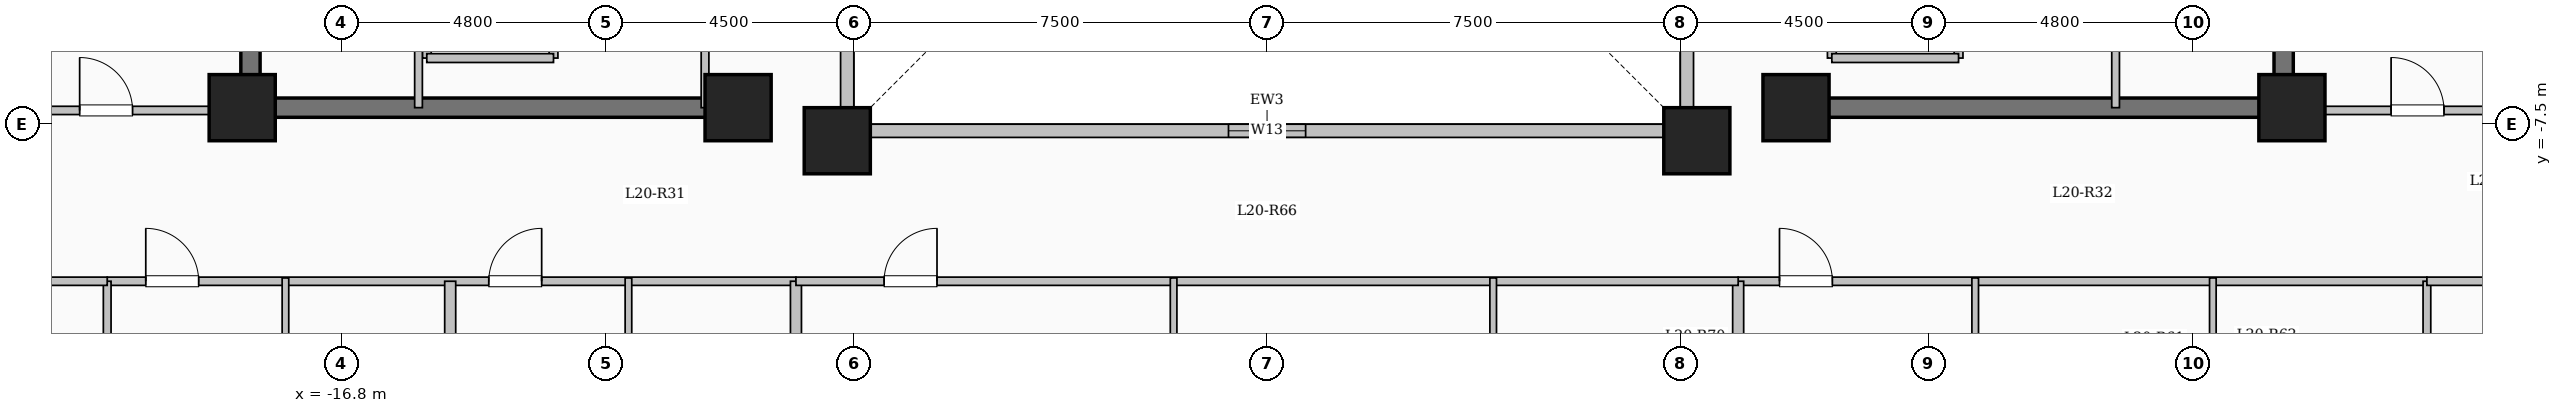
"""IFC4 building model, lengths in metres.
Left out: names, types, materials, properties, quantities, classifications, styles, units other than length and angle.
Written with IfcOpenShell. Run it as: python <this file> out.ifc"""

import sys

from ifc_helpers import new_model, si_unit, direction, frame, frame_2d, origin, origin_2d, place, context, subcontext, project, spatial, rectangle, extrude, element, fill, save


model = new_model("IFC4")
c1 = context("Model", 3, precision=1e-05, world=origin(), true_north=direction((0.0, 1.0)))
c2 = subcontext(c1, "Body", "Model", "MODEL_VIEW")
j1 = project(units=[si_unit("LENGTHUNIT", "METRE"), si_unit("PLANEANGLEUNIT", "RADIAN")], contexts=[c1])
p1 = place(None, origin())
s1 = spatial("IfcSite", under=j1, at=p1, CompositionType="ELEMENT")
p2 = place(p1, origin())
s2 = spatial("IfcBuilding", under=s1, at=p2, CompositionType="ELEMENT")
p3 = place(p2, frame((0.0, 0.0, 78.3)))
s3 = spatial("IfcBuildingStorey", under=s2, at=p3, CompositionType="ELEMENT", Elevation=78.3)
for number, where, z_axis, x_axis in (
    (1, (-7.8, -7.8, 0.0), (0.0, 0.0, 1.0), (1.0, 0.0, 0.0)),
    (2, (7.8, -7.8, 0.0), (0.0, 0.0, 1.0), (1.0, 0.0, 0.0)),
    (3, (-9.6, -7.2, 0.0), (0.0, 0.0, 1.0), (1.0, 0.0, 0.0)),
    (4, (9.6, -7.2, 0.0), (0.0, 0.0, 1.0), (1.0, 0.0, 0.0)),
    (5, (-18.6, -7.2, 0.0), (0.0, 0.0, 1.0), (1.0, 0.0, 0.0)),
    (6, (18.6, -7.2, 0.0), (0.0, 0.0, 1.0), (1.0, 0.0, 0.0)),
):
    element("IfcColumn", number, at=place(p3, frame(where, z_axis=z_axis, x_axis=x_axis)), inside=s3, PredefinedType="COLUMN", context=c2, shape_type="SweptSolid", body=[
        extrude(rectangle(XDim=1.2, YDim=1.2, at=origin_2d()), origin(), (0.0, 0.0, 1.0), 3.35),
    ])
p4 = place(p3, frame((-7.62, -7.62, 0.0), z_axis=(0.0, 0.0, 1.0), x_axis=(1.0, 0.0, 0.0)))
e7 = element("IfcWall", 7, at=p4, inside=s3, PredefinedType="SOLIDWALL", context=c2, shape_type="SweptSolid", body=[
    extrude(rectangle(XDim=15.24, YDim=0.24, at=frame_2d((7.62, 0.0))), origin(), (0.0, 0.0, 1.0), 3.1),
])
p5 = place(p4, frame((6.92, 0.0, 0.95)))
e8 = element("IfcOpeningElement", 8, at=p5, cuts=e7, PredefinedType="OPENING", context=c2, shape_type="SweptSolid", body=[
    extrude(rectangle(XDim=1.4, YDim=1.5, at=frame_2d((0.7, 0.75))), frame((0.0, 0.13, 0.0), z_axis=(0.0, -1.0, 0.0), x_axis=(1.0, 0.0, 0.0)), (0.0, 0.0, 1.0), 0.26),
])
p6 = place(p3, frame((7.62, -7.62, 0.0), z_axis=(0.0, 0.0, 1.0), x_axis=(0.0, 1.0, 0.0)))
e9 = element("IfcWall", 9, at=p6, inside=s3, PredefinedType="SOLIDWALL", context=c2, shape_type="SweptSolid", body=[
    extrude(rectangle(XDim=15.24, YDim=0.24, at=frame_2d((7.62, 0.0))), origin(), (0.0, 0.0, 1.0), 3.1),
])
p7 = place(p6, frame((6.92, 0.0, 0.95)))
e10 = element("IfcOpeningElement", 10, at=p7, cuts=e9, PredefinedType="OPENING", context=c2, shape_type="SweptSolid", body=[
    extrude(rectangle(XDim=1.4, YDim=1.5, at=frame_2d((0.7, 0.75))), frame((0.0, 0.13, 0.0), z_axis=(0.0, -1.0, 0.0), x_axis=(1.0, 0.0, 0.0)), (0.0, 0.0, 1.0), 0.26),
])
p8 = place(p3, frame((-7.62, 7.62, 0.0), z_axis=(0.0, 0.0, 1.0), x_axis=(0.0, -1.0, 0.0)))
e11 = element("IfcWall", 11, at=p8, inside=s3, PredefinedType="SOLIDWALL", context=c2, shape_type="SweptSolid", body=[
    extrude(rectangle(XDim=15.24, YDim=0.24, at=frame_2d((7.62, 0.0))), origin(), (0.0, 0.0, 1.0), 3.1),
])
p9 = place(p8, frame((6.92, 0.0, 0.95)))
e12 = element("IfcOpeningElement", 12, at=p9, cuts=e11, PredefinedType="OPENING", context=c2, shape_type="SweptSolid", body=[
    extrude(rectangle(XDim=1.4, YDim=1.5, at=frame_2d((0.7, 0.75))), frame((0.0, 0.13, 0.0), z_axis=(0.0, -1.0, 0.0), x_axis=(1.0, 0.0, 0.0)), (0.0, 0.0, 1.0), 0.26),
])
for number, where, z_axis, x_axis in (
    (13, (-15.25, -6.3, 0.0), (0.0, 0.0, 1.0), (0.0, 1.0, 0.0)),
    (14, (-12.95, -6.3, 0.0), (0.0, 0.0, 1.0), (0.0, 1.0, 0.0)),
):
    element("IfcWall", number, at=place(p3, frame(where, z_axis=z_axis, x_axis=x_axis)), inside=s3, PredefinedType="SOLIDWALL", context=c2, shape_type="SweptSolid", body=[
        extrude(rectangle(XDim=2.6, YDim=0.16, at=frame_2d((1.3, 0.0))), origin(), (0.0, 0.0, 1.0), 3.1),
    ])
p10 = place(p3, frame((-15.25, -6.3, 0.0), z_axis=(0.0, 0.0, 1.0), x_axis=(1.0, 0.0, 0.0)))
e15 = element("IfcWall", 15, at=p10, inside=s3, PredefinedType="SOLIDWALL", context=c2, shape_type="SweptSolid", body=[
    extrude(rectangle(XDim=2.3, YDim=0.16, at=frame_2d((1.15, 0.0))), origin(), (0.0, 0.0, 1.0), 3.1),
])
p11 = place(p3, frame((10.25, -6.3, 0.0), z_axis=(0.0, 0.0, 1.0), x_axis=(0.0, 1.0, 0.0)))
e16 = element("IfcWall", 16, at=p11, inside=s3, PredefinedType="SOLIDWALL", context=c2, shape_type="SweptSolid", body=[
    extrude(rectangle(XDim=2.6, YDim=0.16, at=frame_2d((1.3, 0.0))), origin(), (0.0, 0.0, 1.0), 3.1),
])
p12 = place(p11, frame((0.75, 0.0, 0.0)))
e17 = element("IfcOpeningElement", 17, at=p12, cuts=e16, PredefinedType="OPENING", context=c2, shape_type="SweptSolid", body=[
    extrude(rectangle(XDim=1.1, YDim=2.15, at=frame_2d((0.55, 1.075))), frame((0.0, 0.09, 0.0), z_axis=(0.0, -1.0, 0.0), x_axis=(1.0, 0.0, 0.0)), (0.0, 0.0, 1.0), 0.18),
])
p13 = place(p3, frame((12.55, -6.3, 0.0), z_axis=(0.0, 0.0, 1.0), x_axis=(0.0, 1.0, 0.0)))
e18 = element("IfcWall", 18, at=p13, inside=s3, PredefinedType="SOLIDWALL", context=c2, shape_type="SweptSolid", body=[
    extrude(rectangle(XDim=2.6, YDim=0.16, at=frame_2d((1.3, 0.0))), origin(), (0.0, 0.0, 1.0), 3.1),
])
p14 = place(p3, frame((10.25, -6.3, 0.0), z_axis=(0.0, 0.0, 1.0), x_axis=(1.0, 0.0, 0.0)))
e19 = element("IfcWall", 19, at=p14, inside=s3, PredefinedType="SOLIDWALL", context=c2, shape_type="SweptSolid", body=[
    extrude(rectangle(XDim=2.3, YDim=0.16, at=frame_2d((1.15, 0.0))), origin(), (0.0, 0.0, 1.0), 3.1),
])
p15 = place(p3, frame((-18.45, -7.375, 0.0), z_axis=(0.0, 0.0, 1.0), x_axis=(0.0, 1.0, 0.0)))
e20 = element("IfcWall", 20, at=p15, inside=s3, PredefinedType="SHEAR", context=c2, shape_type="SweptSolid", body=[
    extrude(rectangle(XDim=14.05, YDim=0.35, at=frame_2d((7.025, 0.0))), origin(), (0.0, 0.0, 1.0), 3.35),
])
p16 = place(p3, frame((-18.625, -7.2, 0.0), z_axis=(0.0, 0.0, 1.0), x_axis=(1.0, 0.0, 0.0)))
e21 = element("IfcWall", 21, at=p16, inside=s3, PredefinedType="SHEAR", context=c2, shape_type="SweptSolid", body=[
    extrude(rectangle(XDim=8.55, YDim=0.35, at=frame_2d((4.275, 0.0))), origin(), (0.0, 0.0, 1.0), 3.35),
])
p17 = place(p3, frame((18.45, -7.375, 0.0), z_axis=(0.0, 0.0, 1.0), x_axis=(0.0, 1.0, 0.0)))
e22 = element("IfcWall", 22, at=p17, inside=s3, PredefinedType="SHEAR", context=c2, shape_type="SweptSolid", body=[
    extrude(rectangle(XDim=14.05, YDim=0.35, at=frame_2d((7.025, 0.0))), origin(), (0.0, 0.0, 1.0), 3.35),
])
p18 = place(p3, frame((10.075, -7.2, 0.0), z_axis=(0.0, 0.0, 1.0), x_axis=(1.0, 0.0, 0.0)))
e23 = element("IfcWall", 23, at=p18, inside=s3, PredefinedType="SHEAR", context=c2, shape_type="SweptSolid", body=[
    extrude(rectangle(XDim=8.55, YDim=0.35, at=frame_2d((4.275, 0.0))), origin(), (0.0, 0.0, 1.0), 3.35),
])
p19 = place(p3, frame((-15.4, -7.2, 0.0), z_axis=(0.0, 0.0, 1.0), x_axis=(0.0, 1.0, 0.0)))
e24 = element("IfcWall", 24, at=p19, inside=s3, PredefinedType="PARTITIONING", context=c2, shape_type="SweptSolid", body=[
    extrude(rectangle(XDim=10.45, YDim=0.14, at=frame_2d((5.225, 0.0))), origin(), (0.0, 0.0, 1.0), 3.1),
])
p20 = place(p19, frame((9.25, 0.0, 0.0)))
e25 = element("IfcOpeningElement", 25, at=p20, cuts=e24, PredefinedType="OPENING", context=c2, shape_type="SweptSolid", body=[
    extrude(rectangle(XDim=0.9, YDim=2.08, at=frame_2d((0.45, 1.04))), frame((0.0, 0.08, 0.0), z_axis=(0.0, -1.0, 0.0), x_axis=(1.0, 0.0, 0.0)), (0.0, 0.0, 1.0), 0.16),
])
p21 = place(p3, frame((-10.2, -7.2, 0.0), z_axis=(0.0, 0.0, 1.0), x_axis=(0.0, 1.0, 0.0)))
e26 = element("IfcWall", 26, at=p21, inside=s3, PredefinedType="PARTITIONING", context=c2, shape_type="SweptSolid", body=[
    extrude(rectangle(XDim=9.12, YDim=0.14, at=frame_2d((4.56, 0.0))), origin(), (0.0, 0.0, 1.0), 3.1),
])
p22 = place(p21, frame((1.9, 0.0, 0.0)))
e27 = element("IfcOpeningElement", 27, at=p22, cuts=e26, PredefinedType="OPENING", context=c2, shape_type="SweptSolid", body=[
    extrude(rectangle(XDim=0.95, YDim=2.12, at=frame_2d((0.475, 1.06))), frame((0.0, 0.08, 0.0), z_axis=(0.0, -1.0, 0.0), x_axis=(1.0, 0.0, 0.0)), (0.0, 0.0, 1.0), 0.16),
])
p23 = place(p21, frame((5.8, 0.0, 0.0)))
e28 = element("IfcOpeningElement", 28, at=p23, cuts=e26, PredefinedType="OPENING", context=c2, shape_type="SweptSolid", body=[
    extrude(rectangle(XDim=0.95, YDim=2.12, at=frame_2d((0.475, 1.06))), frame((0.0, 0.08, 0.0), z_axis=(0.0, -1.0, 0.0), x_axis=(1.0, 0.0, 0.0)), (0.0, 0.0, 1.0), 0.16),
])
p24 = place(p3, frame((15.4, -7.2, 0.0), z_axis=(0.0, 0.0, 1.0), x_axis=(0.0, 1.0, 0.0)))
e29 = element("IfcWall", 29, at=p24, inside=s3, PredefinedType="PARTITIONING", context=c2, shape_type="SweptSolid", body=[
    extrude(rectangle(XDim=10.45, YDim=0.14, at=frame_2d((5.225, 0.0))), origin(), (0.0, 0.0, 1.0), 3.1),
])
p25 = place(p24, frame((9.25, 0.0, 0.0)))
e30 = element("IfcOpeningElement", 30, at=p25, cuts=e29, PredefinedType="OPENING", context=c2, shape_type="SweptSolid", body=[
    extrude(rectangle(XDim=0.9, YDim=2.08, at=frame_2d((0.45, 1.04))), frame((0.0, 0.08, 0.0), z_axis=(0.0, -1.0, 0.0), x_axis=(1.0, 0.0, 0.0)), (0.0, 0.0, 1.0), 0.16),
])
p26 = place(p3, frame((-21.05, -10.35, 0.0), z_axis=(0.0, 0.0, 1.0), x_axis=(1.0, 0.0, 0.0)))
e31 = element("IfcWall", 31, at=p26, inside=s3, PredefinedType="PARTITIONING", context=c2, shape_type="SweptSolid", body=[
    extrude(rectangle(XDim=12.5, YDim=0.15, at=frame_2d((6.25, 0.0))), origin(), (0.0, 0.0, 1.0), 3.1),
])
p27 = place(p26, frame((0.7, 0.0, 0.0)))
e32 = element("IfcOpeningElement", 32, at=p27, cuts=e31, PredefinedType="OPENING", context=c2, shape_type="SweptSolid", body=[
    extrude(rectangle(XDim=0.96, YDim=2.15, at=frame_2d((0.48, 1.075))), frame((0.0, 0.085, 0.0), z_axis=(0.0, -1.0, 0.0), x_axis=(1.0, 0.0, 0.0)), (0.0, 0.0, 1.0), 0.17),
])
p28 = place(p26, frame((6.925, 0.0, 0.0)))
e33 = element("IfcOpeningElement", 33, at=p28, cuts=e31, PredefinedType="OPENING", context=c2, shape_type="SweptSolid", body=[
    extrude(rectangle(XDim=0.96, YDim=2.15, at=frame_2d((0.48, 1.075))), frame((0.0, 0.085, 0.0), z_axis=(0.0, -1.0, 0.0), x_axis=(1.0, 0.0, 0.0)), (0.0, 0.0, 1.0), 0.17),
])
p29 = place(p3, frame((8.55, -10.35, 0.0), z_axis=(0.0, 0.0, 1.0), x_axis=(1.0, 0.0, 0.0)))
e34 = element("IfcWall", 34, at=p29, inside=s3, PredefinedType="PARTITIONING", context=c2, shape_type="SweptSolid", body=[
    extrude(rectangle(XDim=12.5, YDim=0.15, at=frame_2d((6.25, 0.0))), origin(), (0.0, 0.0, 1.0), 3.1),
])
p30 = place(p29, frame((0.75, 0.0, 0.0)))
e35 = element("IfcOpeningElement", 35, at=p30, cuts=e34, PredefinedType="OPENING", context=c2, shape_type="SweptSolid", body=[
    extrude(rectangle(XDim=0.96, YDim=2.15, at=frame_2d((0.48, 1.075))), frame((0.0, 0.085, 0.0), z_axis=(0.0, -1.0, 0.0), x_axis=(1.0, 0.0, 0.0)), (0.0, 0.0, 1.0), 0.17),
])
p31 = place(p3, frame((-14.825, -22.1, 0.0), z_axis=(0.0, 0.0, 1.0), x_axis=(0.0, 1.0, 0.0)))
e36 = element("IfcWall", 36, at=p31, inside=s3, PredefinedType="SOLIDWALL", context=c2, shape_type="SweptSolid", body=[
    extrude(rectangle(XDim=11.75, YDim=0.2, at=frame_2d((5.875, 0.0))), origin(), (0.0, 0.0, 1.0), 2.435),
])
p32 = place(p3, frame((-17.815, -13.51, 0.0), z_axis=(0.0, 0.0, 1.0), x_axis=(0.0, 1.0, 0.0)))
e37 = element("IfcWall", 37, at=p32, inside=s3, PredefinedType="PARTITIONING", context=c2, shape_type="SweptSolid", body=[
    extrude(rectangle(XDim=3.22, YDim=0.12, at=frame_2d((1.61, 0.0))), origin(), (0.0, 0.0, 1.0), 3.1),
])
p33 = place(p32, frame((1.14, 0.0, 0.0)))
e38 = element("IfcOpeningElement", 38, at=p33, cuts=e37, PredefinedType="OPENING", context=c2, shape_type="SweptSolid", body=[
    extrude(rectangle(XDim=0.88, YDim=2.1, at=frame_2d((0.44, 1.05))), frame((0.0, 0.07, 0.0), z_axis=(0.0, -1.0, 0.0), x_axis=(1.0, 0.0, 0.0)), (0.0, 0.0, 1.0), 0.14),
])
p34 = place(p3, frame((-11.59, -13.51, 0.0), z_axis=(0.0, 0.0, 1.0), x_axis=(0.0, 1.0, 0.0)))
e39 = element("IfcWall", 39, at=p34, inside=s3, PredefinedType="PARTITIONING", context=c2, shape_type="SweptSolid", body=[
    extrude(rectangle(XDim=3.22, YDim=0.12, at=frame_2d((1.61, 0.0))), origin(), (0.0, 0.0, 1.0), 3.1),
])
p35 = place(p34, frame((1.14, 0.0, 0.0)))
e40 = element("IfcOpeningElement", 40, at=p35, cuts=e39, PredefinedType="OPENING", context=c2, shape_type="SweptSolid", body=[
    extrude(rectangle(XDim=0.88, YDim=2.1, at=frame_2d((0.44, 1.05))), frame((0.0, 0.07, 0.0), z_axis=(0.0, -1.0, 0.0), x_axis=(1.0, 0.0, 0.0)), (0.0, 0.0, 1.0), 0.14),
])
p36 = place(p3, frame((12.852, -22.1, 0.0), z_axis=(0.0, 0.0, 1.0), x_axis=(0.0, 1.0, 0.0)))
e41 = element("IfcWall", 41, at=p36, inside=s3, PredefinedType="PARTITIONING", context=c2, shape_type="SweptSolid", body=[
    extrude(rectangle(XDim=11.81, YDim=0.12, at=frame_2d((5.905, 0.0))), origin(), (0.0, 0.0, 1.0), 3.1),
])
p37 = place(p36, frame((7.475, 0.0, 0.0)))
e42 = element("IfcOpeningElement", 42, at=p37, cuts=e41, PredefinedType="OPENING", context=c2, shape_type="SweptSolid", body=[
    extrude(rectangle(XDim=1.08, YDim=2.15, at=frame_2d((0.54, 1.075))), frame((0.0, 0.07, 0.0), z_axis=(0.0, -1.0, 0.0), x_axis=(1.0, 0.0, 0.0)), (0.0, 0.0, 1.0), 0.14),
])
p38 = place(p3, frame((17.165, -13.26, 0.0), z_axis=(0.0, 0.0, 1.0), x_axis=(0.0, 1.0, 0.0)))
e43 = element("IfcWall", 43, at=p38, inside=s3, PredefinedType="PARTITIONING", context=c2, shape_type="SweptSolid", body=[
    extrude(rectangle(XDim=2.97, YDim=0.12, at=frame_2d((1.485, 0.0))), origin(), (0.0, 0.0, 1.0), 3.1),
])
for number, where, z_axis, x_axis in (
    (44, (-8.55, -22.704, 0.0), (0.0, 0.0, 1.0), (0.0, 1.0, 0.0)),
    (45, (8.55, -22.704, 0.0), (0.0, 0.0, 1.0), (0.0, 1.0, 0.0)),
):
    element("IfcWall", number, at=place(p3, frame(where, z_axis=z_axis, x_axis=x_axis)), inside=s3, PredefinedType="SOLIDWALL", context=c2, shape_type="SweptSolid", body=[
        extrude(rectangle(XDim=12.354, YDim=0.2, at=frame_2d((6.177, 0.0))), origin(), (0.0, 0.0, 1.0), 3.1),
    ])
p39 = place(p3, frame((-8.55, -10.35, 0.0), z_axis=(0.0, 0.0, 1.0), x_axis=(1.0, 0.0, 0.0)))
e46 = element("IfcWall", 46, at=p39, inside=s3, PredefinedType="PARTITIONING", context=c2, shape_type="SweptSolid", body=[
    extrude(rectangle(XDim=17.1, YDim=0.15, at=frame_2d((8.55, 0.0))), origin(), (0.0, 0.0, 1.0), 3.1),
])
p40 = place(p39, frame((1.6, 0.0, 0.0)))
e47 = element("IfcOpeningElement", 47, at=p40, cuts=e46, PredefinedType="OPENING", context=c2, shape_type="SweptSolid", body=[
    extrude(rectangle(XDim=0.96, YDim=2.15, at=frame_2d((0.48, 1.075))), frame((0.0, 0.085, 0.0), z_axis=(0.0, -1.0, 0.0), x_axis=(1.0, 0.0, 0.0)), (0.0, 0.0, 1.0), 0.17),
])
p41 = place(p3, frame((-1.696, -23.58, 0.0), z_axis=(0.0, 0.0, 1.0), x_axis=(0.0, 1.0, 0.0)))
e48 = element("IfcWall", 48, at=p41, inside=s3, PredefinedType="PARTITIONING", context=c2, shape_type="SweptSolid", body=[
    extrude(rectangle(XDim=13.29, YDim=0.12, at=frame_2d((6.645, 0.0))), origin(), (0.0, 0.0, 1.0), 3.1),
])
p42 = place(p41, frame((9.465, 0.0, 0.0)))
e49 = element("IfcOpeningElement", 49, at=p42, cuts=e48, PredefinedType="OPENING", context=c2, shape_type="SweptSolid", body=[
    extrude(rectangle(XDim=1.08, YDim=2.15, at=frame_2d((0.54, 1.075))), frame((0.0, 0.07, 0.0), z_axis=(0.0, -1.0, 0.0), x_axis=(1.0, 0.0, 0.0)), (0.0, 0.0, 1.0), 0.14),
])
p43 = place(p3, frame((4.104, -12.75, 0.0), z_axis=(0.0, 0.0, 1.0), x_axis=(0.0, 1.0, 0.0)))
e50 = element("IfcWall", 50, at=p43, inside=s3, PredefinedType="PARTITIONING", context=c2, shape_type="SweptSolid", body=[
    extrude(rectangle(XDim=2.46, YDim=0.12, at=frame_2d((1.23, 0.0))), origin(), (0.0, 0.0, 1.0), 3.1),
])
p44 = place(p3, frame((-26.88, -7.25, 0.0), z_axis=(0.0, 0.0, 1.0), x_axis=(1.0, 0.0, 0.0)))
e51 = element("IfcWall", 51, at=p44, inside=s3, PredefinedType="PARTITIONING", context=c2, shape_type="SweptSolid", body=[
    extrude(rectangle(XDim=8.43, YDim=0.15, at=frame_2d((4.215, 0.0))), origin(), (0.0, 0.0, 1.0), 3.1),
])
p45 = place(p44, frame((5.33, 0.0, 0.0)))
e52 = element("IfcOpeningElement", 52, at=p45, cuts=e51, PredefinedType="OPENING", context=c2, shape_type="SweptSolid", body=[
    extrude(rectangle(XDim=0.96, YDim=2.15, at=frame_2d((0.48, 1.075))), frame((0.0, 0.085, 0.0), z_axis=(0.0, -1.0, 0.0), x_axis=(1.0, 0.0, 0.0)), (0.0, 0.0, 1.0), 0.17),
])
p46 = place(p3, frame((18.45, -7.25, 0.0), z_axis=(0.0, 0.0, 1.0), x_axis=(1.0, 0.0, 0.0)))
e53 = element("IfcWall", 53, at=p46, inside=s3, PredefinedType="PARTITIONING", context=c2, shape_type="SweptSolid", body=[
    extrude(rectangle(XDim=8.43, YDim=0.15, at=frame_2d((4.215, 0.0))), origin(), (0.0, 0.0, 1.0), 3.1),
])
p47 = place(p46, frame((1.95, 0.0, 0.0)))
e54 = element("IfcOpeningElement", 54, at=p47, cuts=e53, PredefinedType="OPENING", context=c2, shape_type="SweptSolid", body=[
    extrude(rectangle(XDim=0.96, YDim=2.15, at=frame_2d((0.48, 1.075))), frame((0.0, 0.085, 0.0), z_axis=(0.0, -1.0, 0.0), x_axis=(1.0, 0.0, 0.0)), (0.0, 0.0, 1.0), 0.17),
])
for number, where, z_axis, x_axis in (
    (55, (-21.05, -17.85, 0.0), (0.0, 0.0, 1.0), (0.0, 1.0, 0.0)),
    (56, (21.05, -17.85, 0.0), (0.0, 0.0, 1.0), (0.0, 1.0, 0.0)),
):
    element("IfcWall", number, at=place(p3, frame(where, z_axis=z_axis, x_axis=x_axis)), inside=s3, PredefinedType="PARTITIONING", context=c2, shape_type="SweptSolid", body=[
        extrude(rectangle(XDim=7.5, YDim=0.14, at=frame_2d((3.75, 0.0))), origin(), (0.0, 0.0, 1.0), 3.1),
    ])
p48 = place(p3, frame((-26.88, -10.35, 0.0), z_axis=(0.0, 0.0, 1.0), x_axis=(1.0, 0.0, 0.0)))
e57 = element("IfcWall", 57, at=p48, inside=s3, PredefinedType="PARTITIONING", context=c2, shape_type="SweptSolid", body=[
    extrude(rectangle(XDim=5.83, YDim=0.15, at=frame_2d((2.915, 0.0))), origin(), (0.0, 0.0, 1.0), 3.1),
])
p49 = place(p48, frame((2.44, 0.0, 0.0)))
e58 = element("IfcOpeningElement", 58, at=p49, cuts=e57, PredefinedType="OPENING", context=c2, shape_type="SweptSolid", body=[
    extrude(rectangle(XDim=0.95, YDim=2.15, at=frame_2d((0.475, 1.075))), frame((0.0, 0.085, 0.0), z_axis=(0.0, -1.0, 0.0), x_axis=(1.0, 0.0, 0.0)), (0.0, 0.0, 1.0), 0.17),
])
p50 = place(p3, frame((21.05, -10.35, 0.0), z_axis=(0.0, 0.0, 1.0), x_axis=(1.0, 0.0, 0.0)))
e59 = element("IfcWall", 59, at=p50, inside=s3, PredefinedType="PARTITIONING", context=c2, shape_type="SweptSolid", body=[
    extrude(rectangle(XDim=5.83, YDim=0.15, at=frame_2d((2.915, 0.0))), origin(), (0.0, 0.0, 1.0), 3.1),
])
p51 = place(p50, frame((2.44, 0.0, 0.0)))
e60 = element("IfcOpeningElement", 60, at=p51, cuts=e59, PredefinedType="OPENING", context=c2, shape_type="SweptSolid", body=[
    extrude(rectangle(XDim=0.95, YDim=2.15, at=frame_2d((0.475, 1.075))), frame((0.0, 0.085, 0.0), z_axis=(0.0, -1.0, 0.0), x_axis=(1.0, 0.0, 0.0)), (0.0, 0.0, 1.0), 0.17),
])
p52 = place(p5, origin())
e61 = element("IfcWindow", 61, at=p52, inside=s3, PartitioningType="SINGLE_PANEL", PredefinedType="WINDOW", context=c2, shape_type="SweptSolid", body=[
    extrude(rectangle(XDim=1.4, YDim=1.5, at=frame_2d((0.7, 0.75))), frame((0.0, 0.03, 0.0), z_axis=(0.0, -1.0, 0.0), x_axis=(1.0, 0.0, 0.0)), (0.0, 0.0, 1.0), 0.06),
])
fill(e8, e61)
p53 = place(p27, origin())
e62 = element("IfcDoor", 62, at=p53, inside=s3, OperationType="SINGLE_SWING_LEFT", PredefinedType="DOOR", context=c2, shape_type="SweptSolid", body=[
    extrude(rectangle(XDim=0.96, YDim=2.15, at=frame_2d((0.48, 1.075))), frame((0.0, 0.025, 0.0), z_axis=(0.0, -1.0, 0.0), x_axis=(1.0, 0.0, 0.0)), (0.0, 0.0, 1.0), 0.05),
])
fill(e32, e62)
p54 = place(p28, origin())
e63 = element("IfcDoor", 63, at=p54, inside=s3, OperationType="SINGLE_SWING_RIGHT", PredefinedType="DOOR", context=c2, shape_type="SweptSolid", body=[
    extrude(rectangle(XDim=0.96, YDim=2.15, at=frame_2d((0.48, 1.075))), frame((0.0, 0.025, 0.0), z_axis=(0.0, -1.0, 0.0), x_axis=(1.0, 0.0, 0.0)), (0.0, 0.0, 1.0), 0.05),
])
fill(e33, e63)
p55 = place(p30, origin())
e64 = element("IfcDoor", 64, at=p55, inside=s3, OperationType="SINGLE_SWING_LEFT", PredefinedType="DOOR", context=c2, shape_type="SweptSolid", body=[
    extrude(rectangle(XDim=0.96, YDim=2.15, at=frame_2d((0.48, 1.075))), frame((0.0, 0.025, 0.0), z_axis=(0.0, -1.0, 0.0), x_axis=(1.0, 0.0, 0.0)), (0.0, 0.0, 1.0), 0.05),
])
fill(e35, e64)
p56 = place(p40, origin())
e65 = element("IfcDoor", 65, at=p56, inside=s3, OperationType="SINGLE_SWING_RIGHT", PredefinedType="DOOR", context=c2, shape_type="SweptSolid", body=[
    extrude(rectangle(XDim=0.96, YDim=2.15, at=frame_2d((0.48, 1.075))), frame((0.0, 0.025, 0.0), z_axis=(0.0, -1.0, 0.0), x_axis=(1.0, 0.0, 0.0)), (0.0, 0.0, 1.0), 0.05),
])
fill(e47, e65)
p57 = place(p45, origin())
e66 = element("IfcDoor", 66, at=p57, inside=s3, OperationType="SINGLE_SWING_LEFT", PredefinedType="DOOR", context=c2, shape_type="SweptSolid", body=[
    extrude(rectangle(XDim=0.96, YDim=2.15, at=frame_2d((0.48, 1.075))), frame((0.0, 0.025, 0.0), z_axis=(0.0, -1.0, 0.0), x_axis=(1.0, 0.0, 0.0)), (0.0, 0.0, 1.0), 0.05),
])
fill(e52, e66)
p58 = place(p47, origin())
e67 = element("IfcDoor", 67, at=p58, inside=s3, OperationType="SINGLE_SWING_LEFT", PredefinedType="DOOR", context=c2, shape_type="SweptSolid", body=[
    extrude(rectangle(XDim=0.96, YDim=2.15, at=frame_2d((0.48, 1.075))), frame((0.0, 0.025, 0.0), z_axis=(0.0, -1.0, 0.0), x_axis=(1.0, 0.0, 0.0)), (0.0, 0.0, 1.0), 0.05),
])
fill(e54, e67)
save(model, sys.argv[1])
